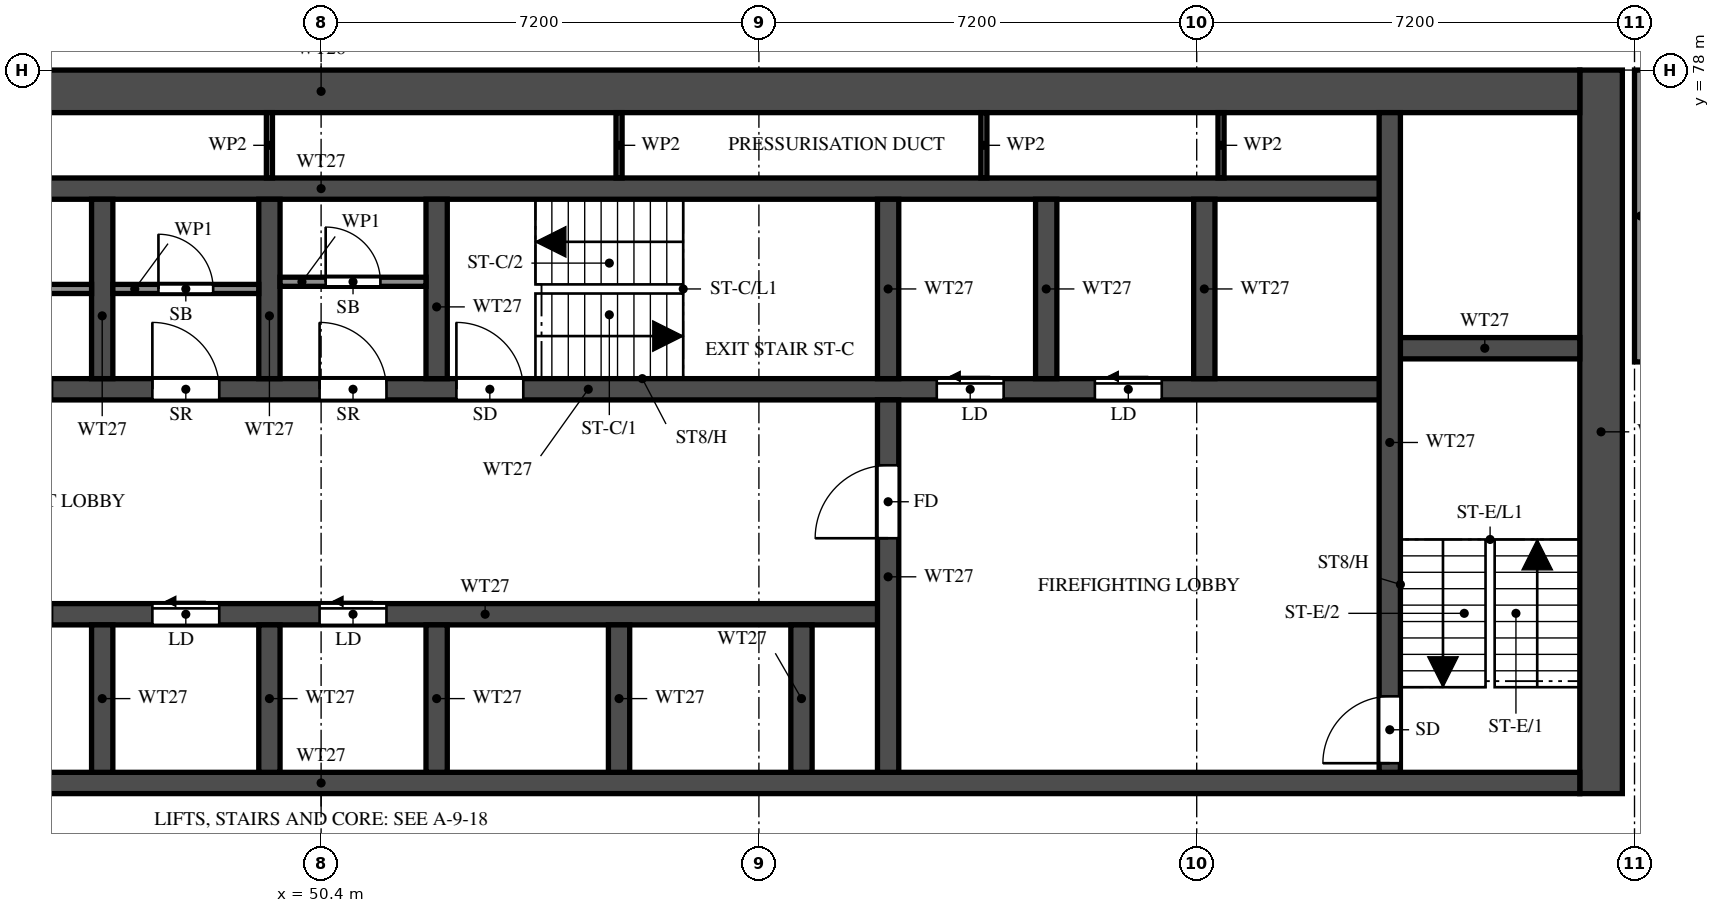
"""IFC4 building model, lengths in metres.
Left out: names, types, materials, properties, quantities, classifications, styles, units other than length and angle.
Written with IfcOpenShell. Run it as: python <this file> out.ifc"""

import sys

from ifc_helpers import new_model, si_unit, direction, frame, frame_2d, origin, place, context, subcontext, project, spatial, rectangle, extrude, element, fill, save


model = new_model("IFC4")
c1 = context("Model", 3, precision=1e-05, world=origin(), true_north=direction((0.0, 1.0)))
c2 = subcontext(c1, "Body", "Model", "MODEL_VIEW")
j1 = project(units=[si_unit("LENGTHUNIT", "METRE"), si_unit("PLANEANGLEUNIT", "RADIAN")], contexts=[c1])
p1 = place(None, origin())
s1 = spatial("IfcSite", under=j1, at=p1, CompositionType="ELEMENT")
p2 = place(p1, origin())
s2 = spatial("IfcBuilding", under=s1, at=p2, CompositionType="ELEMENT")
p3 = place(p2, frame((0.0, 0.0, 123.5)))
s3 = spatial("IfcBuildingStorey", under=s2, at=p3, CompositionType="ELEMENT", Elevation=123.5)
p4 = place(p3, frame((71.45, 66.1, 0.0), z_axis=(0.0, 0.0, 1.0), x_axis=(0.0, 1.0, 0.0)))
e1 = element("IfcWall", 1, at=p4, inside=s3, PredefinedType="SHEAR", context=c2, shape_type="SweptSolid", body=[
    extrude(rectangle(XDim=11.9, YDim=0.7, at=frame_2d((5.95, 0.0))), origin(), (0.0, 0.0, 1.0), 3.2),
])
p5 = place(p3, frame((29.7, 77.65, 0.0), z_axis=(0.0, 0.0, 1.0), x_axis=(1.0, 0.0, 0.0)))
e2 = element("IfcWall", 2, at=p5, inside=s3, PredefinedType="SHEAR", context=c2, shape_type="SweptSolid", body=[
    extrude(rectangle(XDim=41.4, YDim=0.7, at=frame_2d((20.7, 0.0))), origin(), (0.0, 0.0, 1.0), 3.2),
])
p6 = place(p3, frame((29.7, 66.275, 0.0), z_axis=(0.0, 0.0, 1.0), x_axis=(1.0, 0.0, 0.0)))
e3 = element("IfcWall", 3, at=p6, inside=s3, PredefinedType="SHEAR", context=c2, shape_type="SweptSolid", body=[
    extrude(rectangle(XDim=41.4, YDim=0.35, at=frame_2d((20.7, 0.0))), origin(), (0.0, 0.0, 1.0), 3.2),
])
p7 = place(p6, frame((0.925, 0.0, 0.0)))
e4 = element("IfcOpeningElement", 4, at=p7, cuts=e3, PredefinedType="OPENING", context=c2, shape_type="SweptSolid", body=[
    extrude(rectangle(XDim=1.1, YDim=2.1, at=frame_2d((0.55, 1.05))), frame((0.0, 0.185, 0.0), z_axis=(0.0, -1.0, 0.0), x_axis=(1.0, 0.0, 0.0)), (0.0, 0.0, 1.0), 0.37),
])
p8 = place(p6, frame((3.712, 0.0, 0.0)))
e5 = element("IfcOpeningElement", 5, at=p8, cuts=e3, PredefinedType="OPENING", context=c2, shape_type="SweptSolid", body=[
    extrude(rectangle(XDim=1.8, YDim=2.1, at=frame_2d((0.9, 1.05))), frame((0.0, 0.185, 0.0), z_axis=(0.0, -1.0, 0.0), x_axis=(1.0, 0.0, 0.0)), (0.0, 0.0, 1.0), 0.37),
])
p9 = place(p3, frame((35.625, 69.05, 0.0), z_axis=(0.0, 0.0, 1.0), x_axis=(1.0, 0.0, 0.0)))
e6 = element("IfcWall", 6, at=p9, inside=s3, PredefinedType="SHEAR", context=c2, shape_type="SweptSolid", body=[
    extrude(rectangle(XDim=24.1, YDim=0.35, at=frame_2d((12.05, 0.0))), origin(), (0.0, 0.0, 1.0), 3.2),
])
p10 = place(p9, frame((1.0, 0.0, 0.0)))
e7 = element("IfcOpeningElement", 7, at=p10, cuts=e6, PredefinedType="OPENING", context=c2, shape_type="SweptSolid", body=[
    extrude(rectangle(XDim=1.1, YDim=2.1, at=frame_2d((0.55, 1.05))), frame((0.0, 0.185, 0.0), z_axis=(0.0, -1.0, 0.0), x_axis=(1.0, 0.0, 0.0)), (0.0, 0.0, 1.0), 0.37),
])
p11 = place(p9, frame((3.75, 0.0, 0.0)))
e8 = element("IfcOpeningElement", 8, at=p11, cuts=e6, PredefinedType="OPENING", context=c2, shape_type="SweptSolid", body=[
    extrude(rectangle(XDim=1.1, YDim=2.1, at=frame_2d((0.55, 1.05))), frame((0.0, 0.185, 0.0), z_axis=(0.0, -1.0, 0.0), x_axis=(1.0, 0.0, 0.0)), (0.0, 0.0, 1.0), 0.37),
])
p12 = place(p9, frame((6.5, 0.0, 0.0)))
e9 = element("IfcOpeningElement", 9, at=p12, cuts=e6, PredefinedType="OPENING", context=c2, shape_type="SweptSolid", body=[
    extrude(rectangle(XDim=1.1, YDim=2.1, at=frame_2d((0.55, 1.05))), frame((0.0, 0.185, 0.0), z_axis=(0.0, -1.0, 0.0), x_axis=(1.0, 0.0, 0.0)), (0.0, 0.0, 1.0), 0.37),
])
p13 = place(p9, frame((9.25, 0.0, 0.0)))
e10 = element("IfcOpeningElement", 10, at=p13, cuts=e6, PredefinedType="OPENING", context=c2, shape_type="SweptSolid", body=[
    extrude(rectangle(XDim=1.1, YDim=2.1, at=frame_2d((0.55, 1.05))), frame((0.0, 0.185, 0.0), z_axis=(0.0, -1.0, 0.0), x_axis=(1.0, 0.0, 0.0)), (0.0, 0.0, 1.0), 0.37),
])
p14 = place(p9, frame((12.0, 0.0, 0.0)))
e11 = element("IfcOpeningElement", 11, at=p14, cuts=e6, PredefinedType="OPENING", context=c2, shape_type="SweptSolid", body=[
    extrude(rectangle(XDim=1.1, YDim=2.1, at=frame_2d((0.55, 1.05))), frame((0.0, 0.185, 0.0), z_axis=(0.0, -1.0, 0.0), x_axis=(1.0, 0.0, 0.0)), (0.0, 0.0, 1.0), 0.37),
])
p15 = place(p9, frame((14.75, 0.0, 0.0)))
e12 = element("IfcOpeningElement", 12, at=p15, cuts=e6, PredefinedType="OPENING", context=c2, shape_type="SweptSolid", body=[
    extrude(rectangle(XDim=1.1, YDim=2.1, at=frame_2d((0.55, 1.05))), frame((0.0, 0.185, 0.0), z_axis=(0.0, -1.0, 0.0), x_axis=(1.0, 0.0, 0.0)), (0.0, 0.0, 1.0), 0.37),
])
p16 = place(p3, frame((32.825, 72.75, 0.0), z_axis=(0.0, 0.0, 1.0), x_axis=(1.0, 0.0, 0.0)))
e13 = element("IfcWall", 13, at=p16, inside=s3, PredefinedType="SHEAR", context=c2, shape_type="SweptSolid", body=[
    extrude(rectangle(XDim=35.15, YDim=0.35, at=frame_2d((17.575, 0.0))), origin(), (0.0, 0.0, 1.0), 3.2),
])
p17 = place(p16, frame((19.8, 0.0, 0.0)))
e14 = element("IfcOpeningElement", 14, at=p17, cuts=e13, PredefinedType="OPENING", context=c2, shape_type="SweptSolid", body=[
    extrude(rectangle(XDim=1.1, YDim=2.1, at=frame_2d((0.55, 1.05))), frame((0.0, 0.185, 0.0), z_axis=(0.0, -1.0, 0.0), x_axis=(1.0, 0.0, 0.0)), (0.0, 0.0, 1.0), 0.37),
])
p18 = place(p16, frame((27.7, 0.0, 0.0)))
e15 = element("IfcOpeningElement", 15, at=p18, cuts=e13, PredefinedType="OPENING", context=c2, shape_type="SweptSolid", body=[
    extrude(rectangle(XDim=1.1, YDim=2.1, at=frame_2d((0.55, 1.05))), frame((0.0, 0.185, 0.0), z_axis=(0.0, -1.0, 0.0), x_axis=(1.0, 0.0, 0.0)), (0.0, 0.0, 1.0), 0.37),
])
p19 = place(p16, frame((30.3, 0.0, 0.0)))
e16 = element("IfcOpeningElement", 16, at=p19, cuts=e13, PredefinedType="OPENING", context=c2, shape_type="SweptSolid", body=[
    extrude(rectangle(XDim=1.1, YDim=2.1, at=frame_2d((0.55, 1.05))), frame((0.0, 0.185, 0.0), z_axis=(0.0, -1.0, 0.0), x_axis=(1.0, 0.0, 0.0)), (0.0, 0.0, 1.0), 0.37),
])
p20 = place(p16, frame((3.8, 0.0, 0.0)))
e17 = element("IfcOpeningElement", 17, at=p20, cuts=e13, PredefinedType="OPENING", context=c2, shape_type="SweptSolid", body=[
    extrude(rectangle(XDim=1.1, YDim=2.1, at=frame_2d((0.55, 1.05))), frame((0.0, 0.185, 0.0), z_axis=(0.0, -1.0, 0.0), x_axis=(1.0, 0.0, 0.0)), (0.0, 0.0, 1.0), 0.37),
])
p21 = place(p16, frame((6.55, 0.0, 0.0)))
e18 = element("IfcOpeningElement", 18, at=p21, cuts=e13, PredefinedType="OPENING", context=c2, shape_type="SweptSolid", body=[
    extrude(rectangle(XDim=1.1, YDim=2.1, at=frame_2d((0.55, 1.05))), frame((0.0, 0.185, 0.0), z_axis=(0.0, -1.0, 0.0), x_axis=(1.0, 0.0, 0.0)), (0.0, 0.0, 1.0), 0.37),
])
p22 = place(p16, frame((9.3, 0.0, 0.0)))
e19 = element("IfcOpeningElement", 19, at=p22, cuts=e13, PredefinedType="OPENING", context=c2, shape_type="SweptSolid", body=[
    extrude(rectangle(XDim=1.1, YDim=2.1, at=frame_2d((0.55, 1.05))), frame((0.0, 0.185, 0.0), z_axis=(0.0, -1.0, 0.0), x_axis=(1.0, 0.0, 0.0)), (0.0, 0.0, 1.0), 0.37),
])
p23 = place(p16, frame((12.05, 0.0, 0.0)))
e20 = element("IfcOpeningElement", 20, at=p23, cuts=e13, PredefinedType="OPENING", context=c2, shape_type="SweptSolid", body=[
    extrude(rectangle(XDim=1.1, YDim=2.1, at=frame_2d((0.55, 1.05))), frame((0.0, 0.185, 0.0), z_axis=(0.0, -1.0, 0.0), x_axis=(1.0, 0.0, 0.0)), (0.0, 0.0, 1.0), 0.37),
])
p24 = place(p16, frame((14.8, 0.0, 0.0)))
e21 = element("IfcOpeningElement", 21, at=p24, cuts=e13, PredefinedType="OPENING", context=c2, shape_type="SweptSolid", body=[
    extrude(rectangle(XDim=1.1, YDim=2.1, at=frame_2d((0.55, 1.05))), frame((0.0, 0.185, 0.0), z_axis=(0.0, -1.0, 0.0), x_axis=(1.0, 0.0, 0.0)), (0.0, 0.0, 1.0), 0.37),
])
p25 = place(p16, frame((17.55, 0.0, 0.0)))
e22 = element("IfcOpeningElement", 22, at=p25, cuts=e13, PredefinedType="OPENING", context=c2, shape_type="SweptSolid", body=[
    extrude(rectangle(XDim=1.1, YDim=2.1, at=frame_2d((0.55, 1.05))), frame((0.0, 0.185, 0.0), z_axis=(0.0, -1.0, 0.0), x_axis=(1.0, 0.0, 0.0)), (0.0, 0.0, 1.0), 0.37),
])
p26 = place(p16, frame((0.938, 0.0, 0.0)))
e23 = element("IfcOpeningElement", 23, at=p26, cuts=e13, PredefinedType="OPENING", context=c2, shape_type="SweptSolid", body=[
    extrude(rectangle(XDim=1.1, YDim=2.1, at=frame_2d((0.55, 1.05))), frame((0.0, 0.185, 0.0), z_axis=(0.0, -1.0, 0.0), x_axis=(1.0, 0.0, 0.0)), (0.0, 0.0, 1.0), 0.37),
])
p27 = place(p3, frame((32.825, 76.05, 0.0), z_axis=(0.0, 0.0, 1.0), x_axis=(1.0, 0.0, 0.0)))
e24 = element("IfcWall", 24, at=p27, inside=s3, PredefinedType="SHEAR", context=c2, shape_type="SweptSolid", body=[
    extrude(rectangle(XDim=35.15, YDim=0.35, at=frame_2d((17.575, 0.0))), origin(), (0.0, 0.0, 1.0), 3.2),
])
p28 = place(p3, frame((67.975, 73.425, 0.0), z_axis=(0.0, 0.0, 1.0), x_axis=(1.0, 0.0, 0.0)))
e25 = element("IfcWall", 25, at=p28, inside=s3, PredefinedType="SHEAR", context=c2, shape_type="SweptSolid", body=[
    extrude(rectangle(XDim=3.125, YDim=0.35, at=frame_2d((1.562, 0.0))), origin(), (0.0, 0.0, 1.0), 3.2),
])
p29 = place(p3, frame((67.975, 66.45, 0.0), z_axis=(0.0, 0.0, 1.0), x_axis=(0.0, 1.0, 0.0)))
e26 = element("IfcWall", 26, at=p29, inside=s3, PredefinedType="SHEAR", context=c2, shape_type="SweptSolid", body=[
    extrude(rectangle(XDim=10.85, YDim=0.35, at=frame_2d((5.425, 0.0))), origin(), (0.0, 0.0, 1.0), 3.2),
])
p30 = place(p29, frame((0.15, 0.0, 0.0)))
e27 = element("IfcOpeningElement", 27, at=p30, cuts=e26, PredefinedType="OPENING", context=c2, shape_type="SweptSolid", body=[
    extrude(rectangle(XDim=1.1, YDim=2.1, at=frame_2d((0.55, 1.05))), frame((0.0, 0.185, 0.0), z_axis=(0.0, -1.0, 0.0), x_axis=(1.0, 0.0, 0.0)), (0.0, 0.0, 1.0), 0.37),
])
p31 = place(p3, frame((59.725, 66.45, 0.0), z_axis=(0.0, 0.0, 1.0), x_axis=(0.0, 1.0, 0.0)))
e28 = element("IfcWall", 28, at=p31, inside=s3, PredefinedType="SHEAR", context=c2, shape_type="SweptSolid", body=[
    extrude(rectangle(XDim=6.125, YDim=0.35, at=frame_2d((3.062, 0.0))), origin(), (0.0, 0.0, 1.0), 3.2),
])
p32 = place(p31, frame((3.85, 0.0, 0.0)))
e29 = element("IfcOpeningElement", 29, at=p32, cuts=e28, PredefinedType="OPENING", context=c2, shape_type="SweptSolid", body=[
    extrude(rectangle(XDim=1.2, YDim=2.1, at=frame_2d((0.6, 1.05))), frame((0.0, 0.185, 0.0), z_axis=(0.0, -1.0, 0.0), x_axis=(1.0, 0.0, 0.0)), (0.0, 0.0, 1.0), 0.37),
])
p33 = place(p3, frame((59.725, 72.925, 0.0), z_axis=(0.0, 0.0, 1.0), x_axis=(0.0, 1.0, 0.0)))
e30 = element("IfcWall", 30, at=p33, inside=s3, PredefinedType="SHEAR", context=c2, shape_type="SweptSolid", body=[
    extrude(rectangle(XDim=2.95, YDim=0.35, at=frame_2d((1.475, 0.0))), origin(), (0.0, 0.0, 1.0), 3.2),
])
for number, where, z_axis, x_axis in (
    (31, (46.8, 66.45, 0.0), (0.0, 0.0, 1.0), (0.0, 1.0, 0.0)),
    (32, (49.55, 66.45, 0.0), (0.0, 0.0, 1.0), (0.0, 1.0, 0.0)),
    (33, (52.3, 66.45, 0.0), (0.0, 0.0, 1.0), (0.0, 1.0, 0.0)),
    (34, (55.3, 66.45, 0.0), (0.0, 0.0, 1.0), (0.0, 1.0, 0.0)),
    (35, (58.3, 66.45, 0.0), (0.0, 0.0, 1.0), (0.0, 1.0, 0.0)),
):
    element("IfcWall", number, at=place(p3, frame(where, z_axis=z_axis, x_axis=x_axis)), inside=s3, PredefinedType="SHEAR", context=c2, shape_type="SweptSolid", body=[
        extrude(rectangle(XDim=2.425, YDim=0.35, at=frame_2d((1.212, 0.0))), origin(), (0.0, 0.0, 1.0), 3.2),
    ])
for number, where, z_axis, x_axis in (
    (36, (46.8, 72.925, 0.0), (0.0, 0.0, 1.0), (0.0, 1.0, 0.0)),
    (37, (49.55, 72.925, 0.0), (0.0, 0.0, 1.0), (0.0, 1.0, 0.0)),
    (38, (52.3, 72.925, 0.0), (0.0, 0.0, 1.0), (0.0, 1.0, 0.0)),
    (39, (62.325, 72.925, 0.0), (0.0, 0.0, 1.0), (0.0, 1.0, 0.0)),
    (40, (64.925, 72.925, 0.0), (0.0, 0.0, 1.0), (0.0, 1.0, 0.0)),
):
    element("IfcWall", number, at=place(p3, frame(where, z_axis=z_axis, x_axis=x_axis)), inside=s3, PredefinedType="SHEAR", context=c2, shape_type="SweptSolid", body=[
        extrude(rectangle(XDim=2.95, YDim=0.35, at=frame_2d((1.475, 0.0))), origin(), (0.0, 0.0, 1.0), 3.2),
    ])
p34 = place(p3, frame((44.225, 74.4, 0.0), z_axis=(0.0, 0.0, 1.0), x_axis=(1.0, 0.0, 0.0)))
e41 = element("IfcWall", 41, at=p34, inside=s3, PredefinedType="PARTITIONING", context=c2, shape_type="SweptSolid", body=[
    extrude(rectangle(XDim=2.4, YDim=0.15, at=frame_2d((1.2, 0.0))), origin(), (0.0, 0.0, 1.0), 3.2),
])
p35 = place(p34, frame((0.75, 0.0, 0.0)))
e42 = element("IfcOpeningElement", 42, at=p35, cuts=e41, PredefinedType="OPENING", context=c2, shape_type="SweptSolid", body=[
    extrude(rectangle(XDim=0.9, YDim=2.1, at=frame_2d((0.45, 1.05))), frame((0.0, 0.085, 0.0), z_axis=(0.0, -1.0, 0.0), x_axis=(1.0, 0.0, 0.0)), (0.0, 0.0, 1.0), 0.17),
])
p36 = place(p3, frame((46.975, 74.4, 0.0), z_axis=(0.0, 0.0, 1.0), x_axis=(1.0, 0.0, 0.0)))
e43 = element("IfcWall", 43, at=p36, inside=s3, PredefinedType="PARTITIONING", context=c2, shape_type="SweptSolid", body=[
    extrude(rectangle(XDim=2.4, YDim=0.15, at=frame_2d((1.2, 0.0))), origin(), (0.0, 0.0, 1.0), 3.2),
])
p37 = place(p36, frame((0.75, 0.0, 0.0)))
e44 = element("IfcOpeningElement", 44, at=p37, cuts=e43, PredefinedType="OPENING", context=c2, shape_type="SweptSolid", body=[
    extrude(rectangle(XDim=0.9, YDim=2.1, at=frame_2d((0.45, 1.05))), frame((0.0, 0.085, 0.0), z_axis=(0.0, -1.0, 0.0), x_axis=(1.0, 0.0, 0.0)), (0.0, 0.0, 1.0), 0.17),
])
p38 = place(p3, frame((49.725, 74.518, 0.0), z_axis=(0.0, 0.0, 1.0), x_axis=(1.0, 0.0, 0.0)))
e45 = element("IfcWall", 45, at=p38, inside=s3, PredefinedType="PARTITIONING", context=c2, shape_type="SweptSolid", body=[
    extrude(rectangle(XDim=2.4, YDim=0.15, at=frame_2d((1.2, 0.0))), origin(), (0.0, 0.0, 1.0), 3.2),
])
p39 = place(p38, frame((0.75, 0.0, 0.0)))
e46 = element("IfcOpeningElement", 46, at=p39, cuts=e45, PredefinedType="OPENING", context=c2, shape_type="SweptSolid", body=[
    extrude(rectangle(XDim=0.9, YDim=2.1, at=frame_2d((0.45, 1.05))), frame((0.0, 0.085, 0.0), z_axis=(0.0, -1.0, 0.0), x_axis=(1.0, 0.0, 0.0)), (0.0, 0.0, 1.0), 0.17),
])
for number, where, z_axis, x_axis in (
    (47, (49.55, 76.225, 0.0), (0.0, 0.0, 1.0), (0.0, 1.0, 0.0)),
    (48, (55.3, 76.225, 0.0), (0.0, 0.0, 1.0), (0.0, 1.0, 0.0)),
    (49, (61.3, 76.225, 0.0), (0.0, 0.0, 1.0), (0.0, 1.0, 0.0)),
    (50, (65.2, 76.225, 0.0), (0.0, 0.0, 1.0), (0.0, 1.0, 0.0)),
):
    element("IfcWall", number, at=place(p3, frame(where, z_axis=z_axis, x_axis=x_axis)), inside=s3, PredefinedType="PARTITIONING", context=c2, shape_type="SweptSolid", body=[
        extrude(rectangle(XDim=1.075, YDim=0.1, at=frame_2d((0.538, 0.0))), origin(), (0.0, 0.0, 1.0), 3.2),
    ])
p40 = place(p3, frame((72.1, 73.2, 0.0), z_axis=(0.0, 0.0, 1.0), x_axis=(0.0, 1.0, 0.0)))
e51 = element("IfcWall", 51, at=p40, inside=s3, PredefinedType="SOLIDWALL", context=c2, shape_type="SweptSolid", body=[
    extrude(rectangle(XDim=4.8, YDim=0.2, at=frame_2d((2.4, 0.0))), origin(), (0.0, 0.0, 1.0), 3.2),
])
p41 = place(p17, origin())
e52 = element("IfcDoor", 52, at=p41, inside=s3, OperationType="SINGLE_SWING_LEFT", PredefinedType="DOOR", context=c2, shape_type="SweptSolid", body=[
    extrude(rectangle(XDim=1.1, YDim=2.1, at=frame_2d((0.55, 1.05))), frame((0.0, 0.025, 0.0), z_axis=(0.0, -1.0, 0.0), x_axis=(1.0, 0.0, 0.0)), (0.0, 0.0, 1.0), 0.05),
])
fill(e14, e52)
p42 = place(p30, origin())
e53 = element("IfcDoor", 53, at=p42, inside=s3, OperationType="SINGLE_SWING_LEFT", PredefinedType="DOOR", context=c2, shape_type="SweptSolid", body=[
    extrude(rectangle(XDim=1.1, YDim=2.1, at=frame_2d((0.55, 1.05))), frame((0.0, 0.025, 0.0), z_axis=(0.0, -1.0, 0.0), x_axis=(1.0, 0.0, 0.0)), (0.0, 0.0, 1.0), 0.05),
])
fill(e27, e53)
p43 = place(p32, origin())
e54 = element("IfcDoor", 54, at=p43, inside=s3, OperationType="SINGLE_SWING_LEFT", PredefinedType="DOOR", context=c2, shape_type="SweptSolid", body=[
    extrude(rectangle(XDim=1.2, YDim=2.1, at=frame_2d((0.6, 1.05))), frame((0.0, 0.025, 0.0), z_axis=(0.0, -1.0, 0.0), x_axis=(1.0, 0.0, 0.0)), (0.0, 0.0, 1.0), 0.05),
])
fill(e29, e54)
p44 = place(p18, origin())
e55 = element("IfcDoor", 55, at=p44, inside=s3, OperationType="SLIDING_TO_LEFT", PredefinedType="DOOR", context=c2, shape_type="SweptSolid", body=[
    extrude(rectangle(XDim=1.1, YDim=2.1, at=frame_2d((0.55, 1.05))), frame((0.0, 0.025, 0.0), z_axis=(0.0, -1.0, 0.0), x_axis=(1.0, 0.0, 0.0)), (0.0, 0.0, 1.0), 0.05),
])
fill(e15, e55)
p45 = place(p19, origin())
e56 = element("IfcDoor", 56, at=p45, inside=s3, OperationType="SLIDING_TO_LEFT", PredefinedType="DOOR", context=c2, shape_type="SweptSolid", body=[
    extrude(rectangle(XDim=1.1, YDim=2.1, at=frame_2d((0.55, 1.05))), frame((0.0, 0.025, 0.0), z_axis=(0.0, -1.0, 0.0), x_axis=(1.0, 0.0, 0.0)), (0.0, 0.0, 1.0), 0.05),
])
fill(e16, e56)
p46 = place(p14, origin())
e57 = element("IfcDoor", 57, at=p46, inside=s3, OperationType="SLIDING_TO_LEFT", PredefinedType="DOOR", context=c2, shape_type="SweptSolid", body=[
    extrude(rectangle(XDim=1.1, YDim=2.1, at=frame_2d((0.55, 1.05))), frame((0.0, 0.025, 0.0), z_axis=(0.0, -1.0, 0.0), x_axis=(1.0, 0.0, 0.0)), (0.0, 0.0, 1.0), 0.05),
])
fill(e11, e57)
p47 = place(p15, origin())
e58 = element("IfcDoor", 58, at=p47, inside=s3, OperationType="SLIDING_TO_LEFT", PredefinedType="DOOR", context=c2, shape_type="SweptSolid", body=[
    extrude(rectangle(XDim=1.1, YDim=2.1, at=frame_2d((0.55, 1.05))), frame((0.0, 0.025, 0.0), z_axis=(0.0, -1.0, 0.0), x_axis=(1.0, 0.0, 0.0)), (0.0, 0.0, 1.0), 0.05),
])
fill(e12, e58)
p48 = place(p24, origin())
e59 = element("IfcDoor", 59, at=p48, inside=s3, OperationType="SINGLE_SWING_LEFT", PredefinedType="DOOR", context=c2, shape_type="SweptSolid", body=[
    extrude(rectangle(XDim=1.1, YDim=2.1, at=frame_2d((0.55, 1.05))), frame((0.0, 0.025, 0.0), z_axis=(0.0, -1.0, 0.0), x_axis=(1.0, 0.0, 0.0)), (0.0, 0.0, 1.0), 0.05),
])
fill(e21, e59)
p49 = place(p37, origin())
e60 = element("IfcDoor", 60, at=p49, inside=s3, OperationType="SINGLE_SWING_LEFT", PredefinedType="DOOR", context=c2, shape_type="SweptSolid", body=[
    extrude(rectangle(XDim=0.9, YDim=2.1, at=frame_2d((0.45, 1.05))), frame((0.0, 0.025, 0.0), z_axis=(0.0, -1.0, 0.0), x_axis=(1.0, 0.0, 0.0)), (0.0, 0.0, 1.0), 0.05),
])
fill(e44, e60)
p50 = place(p25, origin())
e61 = element("IfcDoor", 61, at=p50, inside=s3, OperationType="SINGLE_SWING_RIGHT", PredefinedType="DOOR", context=c2, shape_type="SweptSolid", body=[
    extrude(rectangle(XDim=1.1, YDim=2.1, at=frame_2d((0.55, 1.05))), frame((0.0, 0.025, 0.0), z_axis=(0.0, -1.0, 0.0), x_axis=(1.0, 0.0, 0.0)), (0.0, 0.0, 1.0), 0.05),
])
fill(e22, e61)
p51 = place(p39, origin())
e62 = element("IfcDoor", 62, at=p51, inside=s3, OperationType="SINGLE_SWING_LEFT", PredefinedType="DOOR", context=c2, shape_type="SweptSolid", body=[
    extrude(rectangle(XDim=0.9, YDim=2.1, at=frame_2d((0.45, 1.05))), frame((0.0, 0.025, 0.0), z_axis=(0.0, -1.0, 0.0), x_axis=(1.0, 0.0, 0.0)), (0.0, 0.0, 1.0), 0.05),
])
fill(e46, e62)
save(model, sys.argv[1])
